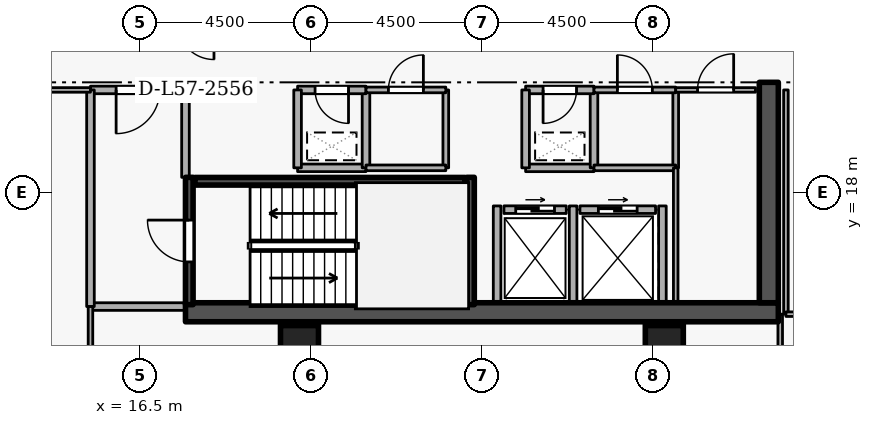
"""IFC4 building model, lengths in metres.
Left out: names, types, materials, properties, quantities, classifications, styles, units other than length and angle.
Written with IfcOpenShell. Run it as: python <this file> out.ifc"""

import sys

from ifc_helpers import new_model, si_unit, direction, frame, frame_2d, origin, origin_2d, place, context, subcontext, project, spatial, rectangle, extrude, element, fill, save


model = new_model("IFC4")
c1 = context("Model", 3, precision=1e-05, world=origin(), true_north=direction((0.0, 1.0)))
c2 = subcontext(c1, "Body", "Model", "MODEL_VIEW")
j1 = project(units=[si_unit("LENGTHUNIT", "METRE"), si_unit("PLANEANGLEUNIT", "RADIAN")], contexts=[c1])
p1 = place(None, origin())
s1 = spatial("IfcSite", under=j1, at=p1, CompositionType="ELEMENT")
p2 = place(p1, origin())
s2 = spatial("IfcBuilding", under=s1, at=p2, CompositionType="ELEMENT")
p3 = place(p2, frame((0.0, 0.0, 214.5)))
s3 = spatial("IfcBuildingStorey", under=s2, at=p3, CompositionType="ELEMENT", Elevation=214.5)
p4 = place(p3, frame((17.7, 14.85, 0.0), z_axis=(0.0, 0.0, 1.0), x_axis=(1.0, 0.0, 0.0)))
e1 = element("IfcWall", 1, at=p4, inside=s3, PredefinedType="SHEAR", context=c2, shape_type="SweptSolid", body=[
    extrude(rectangle(XDim=15.6, YDim=0.5, at=frame_2d((7.8, 0.0))), origin(), (0.0, 0.0, 1.0), 3.6),
])
p5 = place(p3, frame((33.05, 15.1, 0.0), z_axis=(0.0, 0.0, 1.0), x_axis=(0.0, 1.0, 0.0)))
e2 = element("IfcWall", 2, at=p5, inside=s3, PredefinedType="SHEAR", context=c2, shape_type="SweptSolid", body=[
    extrude(rectangle(XDim=5.8, YDim=0.5, at=frame_2d((2.9, 0.0))), origin(), (0.0, 0.0, 1.0), 3.6),
])
for number, where, z_axis, x_axis in (
    (3, (20.7, 14.0, 0.0), (0.0, 0.0, 1.0), (1.0, 0.0, 0.0)),
    (4, (30.3, 14.0, 0.0), (0.0, 0.0, 1.0), (1.0, 0.0, 0.0)),
):
    element("IfcColumn", number, at=place(p3, frame(where, z_axis=z_axis, x_axis=x_axis)), inside=s3, PredefinedType="COLUMN", context=c2, shape_type="SweptSolid", body=[
        extrude(rectangle(XDim=1.0, YDim=1.0, at=origin_2d()), origin(), (0.0, 0.0, 1.0), 3.6),
    ])
p6 = place(p3, frame((26.08, 17.55, 0.0), z_axis=(0.0, 0.0, 1.0), x_axis=(1.0, 0.0, 0.0)))
e5 = element("IfcWall", 5, at=p6, inside=s3, PredefinedType="STANDARD", context=c2, shape_type="SweptSolid", body=[
    extrude(rectangle(XDim=1.64, YDim=0.2, at=frame_2d((0.82, 0.0))), origin(), (0.0, 0.0, 1.0), 3.34),
])
p7 = place(p6, frame((0.31, 0.0, 0.0)))
e6 = element("IfcOpeningElement", 6, at=p7, cuts=e5, PredefinedType="OPENING", context=c2, shape_type="SweptSolid", body=[
    extrude(rectangle(XDim=1.02, YDim=2.06, at=frame_2d((0.51, 1.03))), frame((0.0, 0.11, 0.0), z_axis=(0.0, -1.0, 0.0), x_axis=(1.0, 0.0, 0.0)), (0.0, 0.0, 1.0), 0.22),
])
p8 = place(p3, frame((28.08, 17.55, 0.0), z_axis=(0.0, 0.0, 1.0), x_axis=(1.0, 0.0, 0.0)))
e7 = element("IfcWall", 7, at=p8, inside=s3, PredefinedType="STANDARD", context=c2, shape_type="SweptSolid", body=[
    extrude(rectangle(XDim=1.99, YDim=0.2, at=frame_2d((0.995, 0.0))), origin(), (0.0, 0.0, 1.0), 3.34),
])
p9 = place(p8, frame((0.485, 0.0, 0.0)))
e8 = element("IfcOpeningElement", 8, at=p9, cuts=e7, PredefinedType="OPENING", context=c2, shape_type="SweptSolid", body=[
    extrude(rectangle(XDim=1.02, YDim=2.06, at=frame_2d((0.51, 1.03))), frame((0.0, 0.11, 0.0), z_axis=(0.0, -1.0, 0.0), x_axis=(1.0, 0.0, 0.0)), (0.0, 0.0, 1.0), 0.22),
])
for number, where, z_axis, x_axis in (
    (9, (27.9, 15.112, 0.0), (0.0, 0.0, 1.0), (0.0, 1.0, 0.0)),
    (10, (25.9, 15.112, 0.0), (0.0, 0.0, 1.0), (0.0, 1.0, 0.0)),
    (11, (30.25, 15.112, 0.0), (0.0, 0.0, 1.0), (0.0, 1.0, 0.0)),
):
    element("IfcWall", number, at=place(p3, frame(where, z_axis=z_axis, x_axis=x_axis)), inside=s3, PredefinedType="STANDARD", context=c2, shape_type="SweptSolid", body=[
        extrude(rectangle(XDim=2.536, YDim=0.2, at=frame_2d((1.268, 0.0))), origin(), (0.0, 0.0, 1.0), 3.34),
    ])
p10 = place(p3, frame((17.8, 15.05, 0.0), z_axis=(0.0, 0.0, 1.0), x_axis=(0.0, 1.0, 0.0)))
e12 = element("IfcWall", 12, at=p10, inside=s3, PredefinedType="SHEAR", context=c2, shape_type="SweptSolid", body=[
    extrude(rectangle(XDim=3.35, YDim=0.2, at=frame_2d((1.675, 0.0))), origin(), (0.0, 0.0, 1.0), 3.6),
])
p11 = place(p10, frame((1.125, 0.0, 0.0)))
e13 = element("IfcOpeningElement", 13, at=p11, cuts=e12, PredefinedType="OPENING", context=c2, shape_type="SweptSolid", body=[
    extrude(rectangle(XDim=1.1, YDim=2.1, at=frame_2d((0.55, 1.05))), frame((0.0, 0.11, 0.0), z_axis=(0.0, -1.0, 0.0), x_axis=(1.0, 0.0, 0.0)), (0.0, 0.0, 1.0), 0.22),
])
p12 = place(p3, frame((25.2, 18.4, 0.0), z_axis=(0.0, 0.0, 1.0), x_axis=(0.0, -1.0, 0.0)))
e14 = element("IfcWall", 14, at=p12, inside=s3, PredefinedType="SHEAR", context=c2, shape_type="SweptSolid", body=[
    extrude(rectangle(XDim=3.35, YDim=0.2, at=frame_2d((1.675, 0.0))), origin(), (0.0, 0.0, 1.0), 3.6),
])
p13 = place(p3, frame((25.05, 18.297, 0.0), z_axis=(0.0, 0.0, 1.0), x_axis=(-1.0, 0.0, 0.0)))
e15 = element("IfcWall", 15, at=p13, inside=s3, PredefinedType="SHEAR", context=c2, shape_type="SweptSolid", body=[
    extrude(rectangle(XDim=7.1, YDim=0.2, at=frame_2d((3.55, 0.0))), origin(), (0.0, 0.0, 1.0), 3.6),
])
p14 = place(p3, frame((15.2, 15.0, 0.0), z_axis=(0.0, 0.0, 1.0), x_axis=(1.0, 0.0, 0.0)))
e16 = element("IfcWall", 16, at=p14, inside=s3, PredefinedType="STANDARD", context=c2, shape_type="SweptSolid", body=[
    extrude(rectangle(XDim=2.5, YDim=0.2, at=frame_2d((1.25, 0.0))), origin(), (0.0, 0.0, 1.0), 3.34),
])
p15 = place(p3, frame((17.7, 18.4, 0.0), z_axis=(0.0, 0.0, 1.0), x_axis=(0.0, 1.0, 0.0)))
e17 = element("IfcWall", 17, at=p15, inside=s3, PredefinedType="STANDARD", context=c2, shape_type="SweptSolid", body=[
    extrude(rectangle(XDim=2.3, YDim=0.2, at=frame_2d((1.15, 0.0))), origin(), (0.0, 0.0, 1.0), 2.545),
])
p16 = place(p3, frame((17.7, 20.7, 0.0), z_axis=(0.0, 0.0, 1.0), x_axis=(-1.0, 0.0, 0.0)))
e18 = element("IfcWall", 18, at=p16, inside=s3, PredefinedType="STANDARD", context=c2, shape_type="SweptSolid", body=[
    extrude(rectangle(XDim=2.5, YDim=0.2, at=frame_2d((1.25, 0.0))), origin(), (0.0, 0.0, 1.0), 3.34),
])
p17 = place(p16, frame((0.675, 0.0, 0.0)))
e19 = element("IfcOpeningElement", 19, at=p17, cuts=e18, PredefinedType="OPENING", context=c2, shape_type="SweptSolid", body=[
    extrude(rectangle(XDim=1.15, YDim=2.1, at=frame_2d((0.575, 1.05))), frame((0.0, 0.11, 0.0), z_axis=(0.0, -1.0, 0.0), x_axis=(1.0, 0.0, 0.0)), (0.0, 0.0, 1.0), 0.22),
])
p18 = place(p3, frame((15.2, 20.7, 0.0), z_axis=(0.0, 0.0, 1.0), x_axis=(0.0, -1.0, 0.0)))
e20 = element("IfcWall", 20, at=p18, inside=s3, PredefinedType="STANDARD", context=c2, shape_type="SweptSolid", body=[
    extrude(rectangle(XDim=5.7, YDim=0.2, at=frame_2d((2.85, 0.0))), origin(), (0.0, 0.0, 1.0), 3.34),
])
p19 = place(p3, frame((26.65, 18.65, 0.0), z_axis=(0.0, 0.0, 1.0), x_axis=(1.0, 0.0, 0.0)))
e21 = element("IfcWall", 21, at=p19, inside=s3, PredefinedType="STANDARD", context=c2, shape_type="SweptSolid", body=[
    extrude(rectangle(XDim=1.8, YDim=0.2, at=frame_2d((0.9, 0.0))), origin(), (0.0, 0.0, 1.0), 3.34),
])
p20 = place(p3, frame((28.45, 18.65, 0.0), z_axis=(0.0, 0.0, 1.0), x_axis=(0.0, 1.0, 0.0)))
e22 = element("IfcWall", 22, at=p20, inside=s3, PredefinedType="STANDARD", context=c2, shape_type="SweptSolid", body=[
    extrude(rectangle(XDim=2.05, YDim=0.2, at=frame_2d((1.025, 0.0))), origin(), (0.0, 0.0, 1.0), 3.34),
])
p21 = place(p3, frame((28.45, 20.7, 0.0), z_axis=(0.0, 0.0, 1.0), x_axis=(-1.0, 0.0, 0.0)))
e23 = element("IfcWall", 23, at=p21, inside=s3, PredefinedType="STANDARD", context=c2, shape_type="SweptSolid", body=[
    extrude(rectangle(XDim=1.8, YDim=0.2, at=frame_2d((0.9, 0.0))), origin(), (0.0, 0.0, 1.0), 3.34),
])
p22 = place(p21, frame((0.46, 0.0, 0.0)))
e24 = element("IfcOpeningElement", 24, at=p22, cuts=e23, PredefinedType="OPENING", context=c2, shape_type="SweptSolid", body=[
    extrude(rectangle(XDim=0.88, YDim=2.04, at=frame_2d((0.44, 1.02))), frame((0.0, 0.11, 0.0), z_axis=(0.0, -1.0, 0.0), x_axis=(1.0, 0.0, 0.0)), (0.0, 0.0, 1.0), 0.22),
])
p23 = place(p3, frame((26.65, 20.7, 0.0), z_axis=(0.0, 0.0, 1.0), x_axis=(0.0, -1.0, 0.0)))
e25 = element("IfcWall", 25, at=p23, inside=s3, PredefinedType="STANDARD", context=c2, shape_type="SweptSolid", body=[
    extrude(rectangle(XDim=2.05, YDim=0.2, at=frame_2d((1.025, 0.0))), origin(), (0.0, 0.0, 1.0), 3.34),
])
p24 = place(p3, frame((20.65, 18.65, 0.0), z_axis=(0.0, 0.0, 1.0), x_axis=(1.0, 0.0, 0.0)))
e26 = element("IfcWall", 26, at=p24, inside=s3, PredefinedType="STANDARD", context=c2, shape_type="SweptSolid", body=[
    extrude(rectangle(XDim=1.8, YDim=0.2, at=frame_2d((0.9, 0.0))), origin(), (0.0, 0.0, 1.0), 3.34),
])
p25 = place(p3, frame((22.45, 18.65, 0.0), z_axis=(0.0, 0.0, 1.0), x_axis=(0.0, 1.0, 0.0)))
e27 = element("IfcWall", 27, at=p25, inside=s3, PredefinedType="STANDARD", context=c2, shape_type="SweptSolid", body=[
    extrude(rectangle(XDim=2.05, YDim=0.2, at=frame_2d((1.025, 0.0))), origin(), (0.0, 0.0, 1.0), 3.34),
])
p26 = place(p3, frame((22.45, 20.7, 0.0), z_axis=(0.0, 0.0, 1.0), x_axis=(-1.0, 0.0, 0.0)))
e28 = element("IfcWall", 28, at=p26, inside=s3, PredefinedType="STANDARD", context=c2, shape_type="SweptSolid", body=[
    extrude(rectangle(XDim=1.8, YDim=0.2, at=frame_2d((0.9, 0.0))), origin(), (0.0, 0.0, 1.0), 3.34),
])
p27 = place(p26, frame((0.46, 0.0, 0.0)))
e29 = element("IfcOpeningElement", 29, at=p27, cuts=e28, PredefinedType="OPENING", context=c2, shape_type="SweptSolid", body=[
    extrude(rectangle(XDim=0.88, YDim=2.04, at=frame_2d((0.44, 1.02))), frame((0.0, 0.11, 0.0), z_axis=(0.0, -1.0, 0.0), x_axis=(1.0, 0.0, 0.0)), (0.0, 0.0, 1.0), 0.22),
])
p28 = place(p3, frame((20.65, 20.7, 0.0), z_axis=(0.0, 0.0, 1.0), x_axis=(0.0, -1.0, 0.0)))
e30 = element("IfcWall", 30, at=p28, inside=s3, PredefinedType="STANDARD", context=c2, shape_type="SweptSolid", body=[
    extrude(rectangle(XDim=2.05, YDim=0.2, at=frame_2d((1.025, 0.0))), origin(), (0.0, 0.0, 1.0), 3.34),
])
p29 = place(p3, frame((24.55, 20.7, 0.0), z_axis=(0.0, 0.0, 1.0), x_axis=(0.0, -1.0, 0.0)))
e31 = element("IfcWall", 31, at=p29, inside=s3, PredefinedType="PARTITIONING", context=c2, shape_type="SweptSolid", body=[
    extrude(rectangle(XDim=2.05, YDim=0.15, at=frame_2d((1.025, 0.0))), origin(), (0.0, 0.0, 1.0), 3.34),
])
p30 = place(p3, frame((24.55, 18.65, 0.0), z_axis=(0.0, 0.0, 1.0), x_axis=(-1.0, 0.0, 0.0)))
e32 = element("IfcWall", 32, at=p30, inside=s3, PredefinedType="PARTITIONING", context=c2, shape_type="SweptSolid", body=[
    extrude(rectangle(XDim=2.1, YDim=0.15, at=frame_2d((1.05, 0.0))), origin(), (0.0, 0.0, 1.0), 3.34),
])
p31 = place(p3, frame((22.45, 20.7, 0.0), z_axis=(0.0, 0.0, 1.0), x_axis=(1.0, 0.0, 0.0)))
e33 = element("IfcWall", 33, at=p31, inside=s3, PredefinedType="PARTITIONING", context=c2, shape_type="SweptSolid", body=[
    extrude(rectangle(XDim=2.1, YDim=0.15, at=frame_2d((1.05, 0.0))), origin(), (0.0, 0.0, 1.0), 3.34),
])
p32 = place(p31, frame((0.59, 0.0, 0.0)))
e34 = element("IfcOpeningElement", 34, at=p32, cuts=e33, PredefinedType="OPENING", context=c2, shape_type="SweptSolid", body=[
    extrude(rectangle(XDim=0.92, YDim=2.08, at=frame_2d((0.46, 1.04))), frame((0.0, 0.085, 0.0), z_axis=(0.0, -1.0, 0.0), x_axis=(1.0, 0.0, 0.0)), (0.0, 0.0, 1.0), 0.17),
])
p33 = place(p3, frame((30.6, 20.7, 0.0), z_axis=(0.0, 0.0, 1.0), x_axis=(0.0, -1.0, 0.0)))
e35 = element("IfcWall", 35, at=p33, inside=s3, PredefinedType="PARTITIONING", context=c2, shape_type="SweptSolid", body=[
    extrude(rectangle(XDim=2.05, YDim=0.15, at=frame_2d((1.025, 0.0))), origin(), (0.0, 0.0, 1.0), 3.34),
])
p34 = place(p3, frame((30.6, 18.65, 0.0), z_axis=(0.0, 0.0, 1.0), x_axis=(-1.0, 0.0, 0.0)))
e36 = element("IfcWall", 36, at=p34, inside=s3, PredefinedType="PARTITIONING", context=c2, shape_type="SweptSolid", body=[
    extrude(rectangle(XDim=2.15, YDim=0.15, at=frame_2d((1.075, 0.0))), origin(), (0.0, 0.0, 1.0), 3.34),
])
p35 = place(p3, frame((28.45, 20.7, 0.0), z_axis=(0.0, 0.0, 1.0), x_axis=(1.0, 0.0, 0.0)))
e37 = element("IfcWall", 37, at=p35, inside=s3, PredefinedType="PARTITIONING", context=c2, shape_type="SweptSolid", body=[
    extrude(rectangle(XDim=2.15, YDim=0.15, at=frame_2d((1.075, 0.0))), origin(), (0.0, 0.0, 1.0), 3.34),
])
p36 = place(p35, frame((0.615, 0.0, 0.0)))
e38 = element("IfcOpeningElement", 38, at=p36, cuts=e37, PredefinedType="OPENING", context=c2, shape_type="SweptSolid", body=[
    extrude(rectangle(XDim=0.92, YDim=2.08, at=frame_2d((0.46, 1.04))), frame((0.0, 0.085, 0.0), z_axis=(0.0, -1.0, 0.0), x_axis=(1.0, 0.0, 0.0)), (0.0, 0.0, 1.0), 0.17),
])
p37 = place(p3, frame((30.6, 15.1, 0.0), z_axis=(0.0, 0.0, 1.0), x_axis=(0.0, 1.0, 0.0)))
e39 = element("IfcWall", 39, at=p37, inside=s3, PredefinedType="PARTITIONING", context=c2, shape_type="SweptSolid", body=[
    extrude(rectangle(XDim=3.55, YDim=0.12, at=frame_2d((1.775, 0.0))), origin(), (0.0, 0.0, 1.0), 3.34),
])
p38 = place(p3, frame((30.6, 20.7, 0.0), z_axis=(0.0, 0.0, 1.0), x_axis=(1.0, 0.0, 0.0)))
e40 = element("IfcWall", 40, at=p38, inside=s3, PredefinedType="PARTITIONING", context=c2, shape_type="SweptSolid", body=[
    extrude(rectangle(XDim=2.1, YDim=0.12, at=frame_2d((1.05, 0.0))), origin(), (0.0, 0.0, 1.0), 3.34),
])
p39 = place(p38, frame((0.575, 0.0, 0.0)))
e41 = element("IfcOpeningElement", 41, at=p39, cuts=e40, PredefinedType="OPENING", context=c2, shape_type="SweptSolid", body=[
    extrude(rectangle(XDim=0.95, YDim=2.1, at=frame_2d((0.475, 1.05))), frame((0.0, 0.07, 0.0), z_axis=(0.0, -1.0, 0.0), x_axis=(1.0, 0.0, 0.0)), (0.0, 0.0, 1.0), 0.14),
])
p40 = place(p3, frame((33.5, 20.7, 0.0), z_axis=(0.0, 0.0, 1.0), x_axis=(0.0, -1.0, 0.0)))
e42 = element("IfcWall", 42, at=p40, inside=s3, PredefinedType="PARTITIONING", context=c2, shape_type="SweptSolid", body=[
    extrude(rectangle(XDim=5.9, YDim=0.12, at=frame_2d((2.95, 0.0))), origin(), (0.0, 0.0, 1.0), 3.34),
])
p41 = place(p3, frame((33.5, 14.8, 0.0), z_axis=(0.0, 0.0, 1.0), x_axis=(1.0, 0.0, 0.0)))
e43 = element("IfcWall", 43, at=p41, inside=s3, PredefinedType="PARTITIONING", context=c2, shape_type="SweptSolid", body=[
    extrude(rectangle(XDim=1.85, YDim=0.12, at=frame_2d((0.925, 0.0))), origin(), (0.0, 0.0, 1.0), 3.34),
])
p42 = place(p41, frame((0.45, 0.0, 0.0)))
e44 = element("IfcOpeningElement", 44, at=p42, cuts=e43, PredefinedType="OPENING", context=c2, shape_type="SweptSolid", body=[
    extrude(rectangle(XDim=0.95, YDim=2.1, at=frame_2d((0.475, 1.05))), frame((0.0, 0.07, 0.0), z_axis=(0.0, -1.0, 0.0), x_axis=(1.0, 0.0, 0.0)), (0.0, 0.0, 1.0), 0.14),
])
p43 = place(p3, frame((33.35, 9.28, 0.0), z_axis=(0.0, 0.0, 1.0), x_axis=(0.0, 1.0, 0.0)))
e45 = element("IfcWall", 45, at=p43, inside=s3, PredefinedType="PARTITIONING", context=c2, shape_type="SweptSolid", body=[
    extrude(rectangle(XDim=5.52, YDim=0.12, at=frame_2d((2.76, 0.0))), origin(), (0.0, 0.0, 1.0), 3.34),
])
p44 = place(p3, frame((13.25, 20.7, 0.0), z_axis=(0.0, 0.0, 1.0), x_axis=(1.0, 0.0, 0.0)))
e46 = element("IfcWall", 46, at=p44, inside=s3, PredefinedType="PARTITIONING", context=c2, shape_type="SweptSolid", body=[
    extrude(rectangle(XDim=1.95, YDim=0.12, at=frame_2d((0.975, 0.0))), origin(), (0.0, 0.0, 1.0), 3.34),
])
p45 = place(p3, frame((15.2, 15.0, 0.0), z_axis=(0.0, 0.0, 1.0), x_axis=(0.0, -1.0, 0.0)))
e47 = element("IfcWall", 47, at=p45, inside=s3, PredefinedType="PARTITIONING", context=c2, shape_type="SweptSolid", body=[
    extrude(rectangle(XDim=5.72, YDim=0.12, at=frame_2d((2.86, 0.0))), origin(), (0.0, 0.0, 1.0), 3.34),
])
p46 = place(p7, origin())
e48 = element("IfcDoor", 48, at=p46, inside=s3, OperationType="SLIDING_TO_LEFT", PredefinedType="DOOR", context=c2, shape_type="SweptSolid", body=[
    extrude(rectangle(XDim=1.02, YDim=2.06, at=frame_2d((0.51, 1.03))), frame((0.0, 0.025, 0.0), z_axis=(0.0, -1.0, 0.0), x_axis=(1.0, 0.0, 0.0)), (0.0, 0.0, 1.0), 0.05),
])
fill(e6, e48)
p47 = place(p9, origin())
e49 = element("IfcDoor", 49, at=p47, inside=s3, OperationType="SLIDING_TO_LEFT", PredefinedType="DOOR", context=c2, shape_type="SweptSolid", body=[
    extrude(rectangle(XDim=1.02, YDim=2.06, at=frame_2d((0.51, 1.03))), frame((0.0, 0.025, 0.0), z_axis=(0.0, -1.0, 0.0), x_axis=(1.0, 0.0, 0.0)), (0.0, 0.0, 1.0), 0.05),
])
fill(e8, e49)
p48 = place(p11, origin())
e50 = element("IfcDoor", 50, at=p48, inside=s3, OperationType="SINGLE_SWING_RIGHT", PredefinedType="DOOR", context=c2, shape_type="SweptSolid", body=[
    extrude(rectangle(XDim=1.1, YDim=2.1, at=frame_2d((0.55, 1.05))), frame((0.0, 0.025, 0.0), z_axis=(0.0, -1.0, 0.0), x_axis=(1.0, 0.0, 0.0)), (0.0, 0.0, 1.0), 0.05),
])
fill(e13, e50)
p49 = place(p17, origin())
e51 = element("IfcDoor", 51, at=p49, inside=s3, OperationType="SINGLE_SWING_RIGHT", PredefinedType="DOOR", context=c2, shape_type="SweptSolid", body=[
    extrude(rectangle(XDim=1.15, YDim=2.1, at=frame_2d((0.575, 1.05))), frame((0.0, 0.025, 0.0), z_axis=(0.0, -1.0, 0.0), x_axis=(1.0, 0.0, 0.0)), (0.0, 0.0, 1.0), 0.05),
])
fill(e19, e51)
p50 = place(p22, origin())
e52 = element("IfcDoor", 52, at=p50, inside=s3, OperationType="SINGLE_SWING_RIGHT", PredefinedType="DOOR", context=c2, shape_type="SweptSolid", body=[
    extrude(rectangle(XDim=0.88, YDim=2.04, at=frame_2d((0.44, 1.02))), frame((0.0, 0.025, 0.0), z_axis=(0.0, -1.0, 0.0), x_axis=(1.0, 0.0, 0.0)), (0.0, 0.0, 1.0), 0.05),
])
fill(e24, e52)
p51 = place(p27, origin())
e53 = element("IfcDoor", 53, at=p51, inside=s3, OperationType="SINGLE_SWING_LEFT", PredefinedType="DOOR", context=c2, shape_type="SweptSolid", body=[
    extrude(rectangle(XDim=0.88, YDim=2.04, at=frame_2d((0.44, 1.02))), frame((0.0, 0.025, 0.0), z_axis=(0.0, -1.0, 0.0), x_axis=(1.0, 0.0, 0.0)), (0.0, 0.0, 1.0), 0.05),
])
fill(e29, e53)
p52 = place(p32, origin())
e54 = element("IfcDoor", 54, at=p52, inside=s3, OperationType="SINGLE_SWING_RIGHT", PredefinedType="DOOR", context=c2, shape_type="SweptSolid", body=[
    extrude(rectangle(XDim=0.92, YDim=2.08, at=frame_2d((0.46, 1.04))), frame((0.0, 0.025, 0.0), z_axis=(0.0, -1.0, 0.0), x_axis=(1.0, 0.0, 0.0)), (0.0, 0.0, 1.0), 0.05),
])
fill(e34, e54)
p53 = place(p36, origin())
e55 = element("IfcDoor", 55, at=p53, inside=s3, OperationType="SINGLE_SWING_LEFT", PredefinedType="DOOR", context=c2, shape_type="SweptSolid", body=[
    extrude(rectangle(XDim=0.92, YDim=2.08, at=frame_2d((0.46, 1.04))), frame((0.0, 0.025, 0.0), z_axis=(0.0, -1.0, 0.0), x_axis=(1.0, 0.0, 0.0)), (0.0, 0.0, 1.0), 0.05),
])
fill(e38, e55)
p54 = place(p39, origin())
e56 = element("IfcDoor", 56, at=p54, inside=s3, OperationType="SINGLE_SWING_RIGHT", PredefinedType="DOOR", context=c2, shape_type="SweptSolid", body=[
    extrude(rectangle(XDim=0.95, YDim=2.1, at=frame_2d((0.475, 1.05))), frame((0.0, 0.025, 0.0), z_axis=(0.0, -1.0, 0.0), x_axis=(1.0, 0.0, 0.0)), (0.0, 0.0, 1.0), 0.05),
])
fill(e41, e56)
save(model, sys.argv[1])
